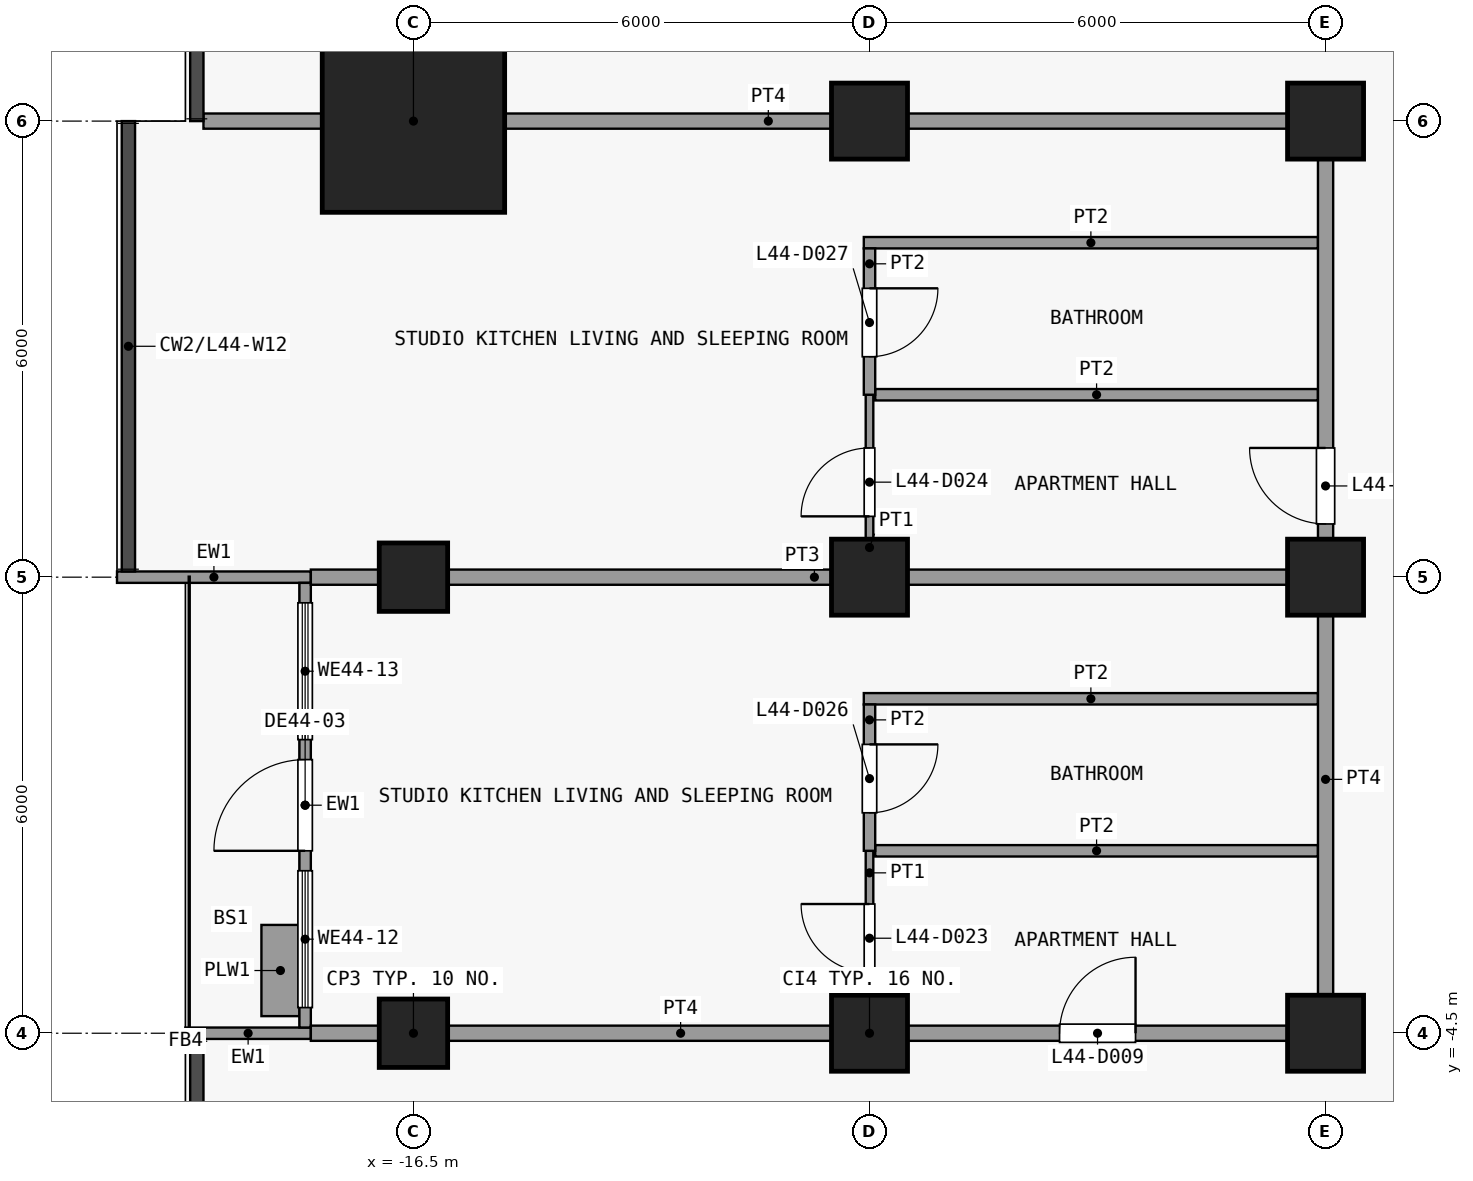
"""IFC4 building model, lengths in metres.
Left out: names, types, materials, properties, quantities, classifications, styles, units other than length and angle.
Written with IfcOpenShell. Run it as: python <this file> out.ifc"""

import sys

from ifc_helpers import new_model, si_unit, direction, frame, frame_2d, origin, origin_2d, place, context, subcontext, project, spatial, rectangle, extrude, element, fill, save


model = new_model("IFC4")
c1 = context("Model", 3, precision=1e-05, world=origin(), true_north=direction((0.0, 1.0)))
c2 = subcontext(c1, "Body", "Model", "MODEL_VIEW")
j1 = project(units=[si_unit("LENGTHUNIT", "METRE"), si_unit("PLANEANGLEUNIT", "RADIAN")], contexts=[c1])
p1 = place(None, origin())
s1 = spatial("IfcSite", under=j1, at=p1, CompositionType="ELEMENT")
p2 = place(p1, origin())
s2 = spatial("IfcBuilding", under=s1, at=p2, CompositionType="ELEMENT")
p3 = place(p2, frame((0.0, 0.0, 178.1)))
s3 = spatial("IfcBuildingStorey", under=s2, at=p3, CompositionType="ELEMENT", Elevation=178.1)
for number, where, z_axis, x_axis in (
    (1, (-16.5, -4.5, 0.0), (0.0, 0.0, 1.0), (1.0, 0.0, 0.0)),
    (2, (-16.5, 1.5, 0.0), (0.0, 0.0, 1.0), (1.0, 0.0, 0.0)),
):
    element("IfcColumn", number, at=place(p3, frame(where, z_axis=z_axis, x_axis=x_axis)), inside=s3, PredefinedType="COLUMN", context=c2, shape_type="SweptSolid", body=[
        extrude(rectangle(XDim=0.9, YDim=0.9, at=origin_2d()), origin(), (0.0, 0.0, 1.0), 3.6),
    ])
p4 = place(p3, frame((-16.5, 7.5, 0.0), z_axis=(0.0, 0.0, 1.0), x_axis=(1.0, 0.0, 0.0)))
e3 = element("IfcColumn", 3, at=p4, inside=s3, PredefinedType="COLUMN", context=c2, shape_type="SweptSolid", body=[
    extrude(rectangle(XDim=2.4, YDim=2.4, at=origin_2d()), origin(), (0.0, 0.0, 1.0), 3.6),
])
for number, where, z_axis, x_axis in (
    (4, (-10.5, -4.5, 0.0), (0.0, 0.0, 1.0), (1.0, 0.0, 0.0)),
    (5, (-10.5, 1.5, 0.0), (0.0, 0.0, 1.0), (1.0, 0.0, 0.0)),
    (6, (-10.5, 7.5, 0.0), (0.0, 0.0, 1.0), (1.0, 0.0, 0.0)),
    (7, (-4.5, -4.5, 0.0), (0.0, 0.0, 1.0), (1.0, 0.0, 0.0)),
    (8, (-4.5, 1.5, 0.0), (0.0, 0.0, 1.0), (1.0, 0.0, 0.0)),
    (9, (-4.5, 7.5, 0.0), (0.0, 0.0, 1.0), (1.0, 0.0, 0.0)),
):
    element("IfcColumn", number, at=place(p3, frame(where, z_axis=z_axis, x_axis=x_axis)), inside=s3, PredefinedType="COLUMN", context=c2, shape_type="SweptSolid", body=[
        extrude(rectangle(XDim=1.0, YDim=1.0, at=origin_2d()), origin(), (0.0, 0.0, 1.0), 3.6),
    ])
p5 = place(p3, frame((-17.85, -4.5, 0.0), z_axis=(0.0, 0.0, 1.0), x_axis=(-1.0, 0.0, 0.0)))
e10 = element("IfcWall", 10, at=p5, inside=s3, PredefinedType="SOLIDWALL", context=c2, shape_type="SweptSolid", body=[
    extrude(rectangle(XDim=1.65, YDim=0.15, at=frame_2d((0.825, 0.0))), origin(), (0.0, 0.0, 1.0), 3.3),
])
p6 = place(p3, frame((-17.85, 1.5, 0.0), z_axis=(0.0, 0.0, 1.0), x_axis=(-1.0, 0.0, 0.0)))
e11 = element("IfcWall", 11, at=p6, inside=s3, PredefinedType="SOLIDWALL", context=c2, shape_type="SweptSolid", body=[
    extrude(rectangle(XDim=2.55, YDim=0.15, at=frame_2d((1.275, 0.0))), origin(), (0.0, 0.0, 1.0), 3.3),
])
p7 = place(p3, frame((-17.925, -4.425, 0.0), z_axis=(0.0, 0.0, 1.0), x_axis=(0.0, 1.0, 0.0)))
e12 = element("IfcWall", 12, at=p7, inside=s3, PredefinedType="SOLIDWALL", context=c2, shape_type="SweptSolid", body=[
    extrude(rectangle(XDim=5.85, YDim=0.15, at=frame_2d((2.925, 0.0))), origin(), (0.0, 0.0, 1.0), 3.3),
])
p8 = place(p7, frame((2.325, 0.0, 0.0)))
e13 = element("IfcOpeningElement", 13, at=p8, cuts=e12, PredefinedType="OPENING", context=c2, shape_type="SweptSolid", body=[
    extrude(rectangle(XDim=1.2, YDim=2.4, at=frame_2d((0.6, 1.2))), frame((0.0, 0.085, 0.0), z_axis=(0.0, -1.0, 0.0), x_axis=(1.0, 0.0, 0.0)), (0.0, 0.0, 1.0), 0.17),
])
p9 = place(p7, frame((0.262, 0.0, 0.9)))
e14 = element("IfcOpeningElement", 14, at=p9, cuts=e12, PredefinedType="OPENING", context=c2, shape_type="SweptSolid", body=[
    extrude(rectangle(XDim=1.8, YDim=2.1, at=frame_2d((0.9, 1.05))), frame((0.0, 0.085, 0.0), z_axis=(0.0, -1.0, 0.0), x_axis=(1.0, 0.0, 0.0)), (0.0, 0.0, 1.0), 0.17),
])
p10 = place(p7, frame((3.788, 0.0, 0.9)))
e15 = element("IfcOpeningElement", 15, at=p10, cuts=e12, PredefinedType="OPENING", context=c2, shape_type="SweptSolid", body=[
    extrude(rectangle(XDim=1.8, YDim=2.1, at=frame_2d((0.9, 1.05))), frame((0.0, 0.085, 0.0), z_axis=(0.0, -1.0, 0.0), x_axis=(1.0, 0.0, 0.0)), (0.0, 0.0, 1.0), 0.17),
])
p11 = place(p3, frame((-18.25, -4.275, 0.0), z_axis=(0.0, 0.0, 1.0), x_axis=(0.0, 1.0, 0.0)))
e16 = element("IfcWall", 16, at=p11, inside=s3, PredefinedType="USERDEFINED", context=c2, shape_type="SweptSolid", body=[
    extrude(rectangle(XDim=1.2, YDim=0.5, at=frame_2d((0.6, 0.0))), origin(), (0.0, 0.0, 1.0), 0.9),
])
p12 = place(p3, frame((-17.85, -4.5, 0.0), z_axis=(0.0, 0.0, 1.0), x_axis=(1.0, 0.0, 0.0)))
e17 = element("IfcWall", 17, at=p12, inside=s3, PredefinedType="PARTITIONING", context=c2, shape_type="SweptSolid", body=[
    extrude(rectangle(XDim=13.45, YDim=0.2, at=frame_2d((6.725, 0.0))), origin(), (0.0, 0.0, 1.0), 3.3),
])
p13 = place(p12, frame((9.85, 0.0, 0.0)))
e18 = element("IfcOpeningElement", 18, at=p13, cuts=e17, PredefinedType="OPENING", context=c2, shape_type="SweptSolid", body=[
    extrude(rectangle(XDim=1.0, YDim=2.1, at=frame_2d((0.5, 1.05))), frame((0.0, 0.11, 0.0), z_axis=(0.0, -1.0, 0.0), x_axis=(1.0, 0.0, 0.0)), (0.0, 0.0, 1.0), 0.22),
])
p14 = place(p3, frame((-10.425, -2.1, 0.0), z_axis=(0.0, 0.0, 1.0), x_axis=(1.0, 0.0, 0.0)))
e19 = element("IfcWall", 19, at=p14, inside=s3, PredefinedType="PARTITIONING", context=c2, shape_type="SweptSolid", body=[
    extrude(rectangle(XDim=5.825, YDim=0.15, at=frame_2d((2.913, 0.0))), origin(), (0.0, 0.0, 1.0), 3.3),
])
p15 = place(p3, frame((-10.575, -0.1, 0.0), z_axis=(0.0, 0.0, 1.0), x_axis=(1.0, 0.0, 0.0)))
e20 = element("IfcWall", 20, at=p15, inside=s3, PredefinedType="PARTITIONING", context=c2, shape_type="SweptSolid", body=[
    extrude(rectangle(XDim=5.975, YDim=0.15, at=frame_2d((2.987, 0.0))), origin(), (0.0, 0.0, 1.0), 3.3),
])
p16 = place(p3, frame((-17.85, 1.5, 0.0), z_axis=(0.0, 0.0, 1.0), x_axis=(1.0, 0.0, 0.0)))
e21 = element("IfcWall", 21, at=p16, inside=s3, PredefinedType="PARTITIONING", context=c2, shape_type="SweptSolid", body=[
    extrude(rectangle(XDim=13.25, YDim=0.2, at=frame_2d((6.625, 0.0))), origin(), (0.0, 0.0, 1.0), 3.3),
])
p17 = place(p3, frame((-10.425, 3.9, 0.0), z_axis=(0.0, 0.0, 1.0), x_axis=(1.0, 0.0, 0.0)))
e22 = element("IfcWall", 22, at=p17, inside=s3, PredefinedType="PARTITIONING", context=c2, shape_type="SweptSolid", body=[
    extrude(rectangle(XDim=5.825, YDim=0.15, at=frame_2d((2.913, 0.0))), origin(), (0.0, 0.0, 1.0), 3.3),
])
p18 = place(p3, frame((-10.575, 5.9, 0.0), z_axis=(0.0, 0.0, 1.0), x_axis=(1.0, 0.0, 0.0)))
e23 = element("IfcWall", 23, at=p18, inside=s3, PredefinedType="PARTITIONING", context=c2, shape_type="SweptSolid", body=[
    extrude(rectangle(XDim=5.975, YDim=0.15, at=frame_2d((2.987, 0.0))), origin(), (0.0, 0.0, 1.0), 3.3),
])
p19 = place(p3, frame((-19.262, 7.5, 0.0), z_axis=(0.0, 0.0, 1.0), x_axis=(1.0, 0.0, 0.0)))
e24 = element("IfcWall", 24, at=p19, inside=s3, PredefinedType="PARTITIONING", context=c2, shape_type="SweptSolid", body=[
    extrude(rectangle(XDim=14.863, YDim=0.2, at=frame_2d((7.431, 0.0))), origin(), (0.0, 0.0, 1.0), 3.3),
])
p20 = place(p3, frame((-10.5, -4.4, 0.0), z_axis=(0.0, 0.0, 1.0), x_axis=(0.0, 1.0, 0.0)))
e25 = element("IfcWall", 25, at=p20, inside=s3, PredefinedType="PARTITIONING", context=c2, shape_type="SweptSolid", body=[
    extrude(rectangle(XDim=2.3, YDim=0.1, at=frame_2d((1.15, 0.0))), origin(), (0.0, 0.0, 1.0), 3.3),
])
p21 = place(p20, frame((0.7, 0.0, 0.0)))
e26 = element("IfcOpeningElement", 26, at=p21, cuts=e25, PredefinedType="OPENING", context=c2, shape_type="SweptSolid", body=[
    extrude(rectangle(XDim=0.9, YDim=2.1, at=frame_2d((0.45, 1.05))), frame((0.0, 0.06, 0.0), z_axis=(0.0, -1.0, 0.0), x_axis=(1.0, 0.0, 0.0)), (0.0, 0.0, 1.0), 0.12),
])
p22 = place(p3, frame((-10.5, 1.6, 0.0), z_axis=(0.0, 0.0, 1.0), x_axis=(0.0, 1.0, 0.0)))
e27 = element("IfcWall", 27, at=p22, inside=s3, PredefinedType="PARTITIONING", context=c2, shape_type="SweptSolid", body=[
    extrude(rectangle(XDim=2.3, YDim=0.1, at=frame_2d((1.15, 0.0))), origin(), (0.0, 0.0, 1.0), 3.3),
])
p23 = place(p22, frame((0.7, 0.0, 0.0)))
e28 = element("IfcOpeningElement", 28, at=p23, cuts=e27, PredefinedType="OPENING", context=c2, shape_type="SweptSolid", body=[
    extrude(rectangle(XDim=0.9, YDim=2.1, at=frame_2d((0.45, 1.05))), frame((0.0, 0.06, 0.0), z_axis=(0.0, -1.0, 0.0), x_axis=(1.0, 0.0, 0.0)), (0.0, 0.0, 1.0), 0.12),
])
p24 = place(p3, frame((-10.5, -2.1, 0.0), z_axis=(0.0, 0.0, 1.0), x_axis=(0.0, 1.0, 0.0)))
e29 = element("IfcWall", 29, at=p24, inside=s3, PredefinedType="PARTITIONING", context=c2, shape_type="SweptSolid", body=[
    extrude(rectangle(XDim=1.925, YDim=0.15, at=frame_2d((0.962, 0.0))), origin(), (0.0, 0.0, 1.0), 3.3),
])
p25 = place(p24, frame((0.5, 0.0, 0.0)))
e30 = element("IfcOpeningElement", 30, at=p25, cuts=e29, PredefinedType="OPENING", context=c2, shape_type="SweptSolid", body=[
    extrude(rectangle(XDim=0.9, YDim=2.1, at=frame_2d((0.45, 1.05))), frame((0.0, 0.085, 0.0), z_axis=(0.0, -1.0, 0.0), x_axis=(1.0, 0.0, 0.0)), (0.0, 0.0, 1.0), 0.17),
])
p26 = place(p3, frame((-10.5, 3.9, 0.0), z_axis=(0.0, 0.0, 1.0), x_axis=(0.0, 1.0, 0.0)))
e31 = element("IfcWall", 31, at=p26, inside=s3, PredefinedType="PARTITIONING", context=c2, shape_type="SweptSolid", body=[
    extrude(rectangle(XDim=1.925, YDim=0.15, at=frame_2d((0.962, 0.0))), origin(), (0.0, 0.0, 1.0), 3.3),
])
p27 = place(p26, frame((0.5, 0.0, 0.0)))
e32 = element("IfcOpeningElement", 32, at=p27, cuts=e31, PredefinedType="OPENING", context=c2, shape_type="SweptSolid", body=[
    extrude(rectangle(XDim=0.9, YDim=2.1, at=frame_2d((0.45, 1.05))), frame((0.0, 0.085, 0.0), z_axis=(0.0, -1.0, 0.0), x_axis=(1.0, 0.0, 0.0)), (0.0, 0.0, 1.0), 0.17),
])
p28 = place(p3, frame((-4.5, -4.4, 0.0), z_axis=(0.0, 0.0, 1.0), x_axis=(0.0, 1.0, 0.0)))
e33 = element("IfcWall", 33, at=p28, inside=s3, PredefinedType="PARTITIONING", context=c2, shape_type="SweptSolid", body=[
    extrude(rectangle(XDim=11.8, YDim=0.2, at=frame_2d((5.9, 0.0))), origin(), (0.0, 0.0, 1.0), 3.3),
])
p29 = place(p28, frame((6.6, 0.0, 0.0)))
e34 = element("IfcOpeningElement", 34, at=p29, cuts=e33, PredefinedType="OPENING", context=c2, shape_type="SweptSolid", body=[
    extrude(rectangle(XDim=1.0, YDim=2.1, at=frame_2d((0.5, 1.05))), frame((0.0, 0.11, 0.0), z_axis=(0.0, -1.0, 0.0), x_axis=(1.0, 0.0, 0.0)), (0.0, 0.0, 1.0), 0.22),
])
p30 = place(p8, origin())
e35 = element("IfcDoor", 35, at=p30, inside=s3, OperationType="SINGLE_SWING_LEFT", PredefinedType="DOOR", context=c2, shape_type="SweptSolid", body=[
    extrude(rectangle(XDim=1.2, YDim=2.4, at=frame_2d((0.6, 1.2))), frame((0.0, 0.025, 0.0), z_axis=(0.0, -1.0, 0.0), x_axis=(1.0, 0.0, 0.0)), (0.0, 0.0, 1.0), 0.05),
])
fill(e13, e35)
p31 = place(p9, origin())
e36 = element("IfcWindow", 36, at=p31, inside=s3, PartitioningType="SINGLE_PANEL", PredefinedType="WINDOW", context=c2, shape_type="SweptSolid", body=[
    extrude(rectangle(XDim=1.8, YDim=2.1, at=frame_2d((0.9, 1.05))), frame((0.0, 0.03, 0.0), z_axis=(0.0, -1.0, 0.0), x_axis=(1.0, 0.0, 0.0)), (0.0, 0.0, 1.0), 0.06),
])
fill(e14, e36)
p32 = place(p10, origin())
e37 = element("IfcWindow", 37, at=p32, inside=s3, PartitioningType="SINGLE_PANEL", PredefinedType="WINDOW", context=c2, shape_type="SweptSolid", body=[
    extrude(rectangle(XDim=1.8, YDim=2.1, at=frame_2d((0.9, 1.05))), frame((0.0, 0.03, 0.0), z_axis=(0.0, -1.0, 0.0), x_axis=(1.0, 0.0, 0.0)), (0.0, 0.0, 1.0), 0.06),
])
fill(e15, e37)
p33 = place(p13, origin())
e38 = element("IfcDoor", 38, at=p33, inside=s3, OperationType="SINGLE_SWING_LEFT", PredefinedType="DOOR", context=c2, shape_type="SweptSolid", body=[
    extrude(rectangle(XDim=1.0, YDim=2.1, at=frame_2d((0.5, 1.05))), frame((0.0, 0.025, 0.0), z_axis=(0.0, -1.0, 0.0), x_axis=(1.0, 0.0, 0.0)), (0.0, 0.0, 1.0), 0.05),
])
fill(e18, e38)
p34 = place(p21, origin())
e39 = element("IfcDoor", 39, at=p34, inside=s3, OperationType="SINGLE_SWING_LEFT", PredefinedType="DOOR", context=c2, shape_type="SweptSolid", body=[
    extrude(rectangle(XDim=0.9, YDim=2.1, at=frame_2d((0.45, 1.05))), frame((0.0, 0.025, 0.0), z_axis=(0.0, -1.0, 0.0), x_axis=(1.0, 0.0, 0.0)), (0.0, 0.0, 1.0), 0.05),
])
fill(e26, e39)
p35 = place(p23, origin())
e40 = element("IfcDoor", 40, at=p35, inside=s3, OperationType="SINGLE_SWING_RIGHT", PredefinedType="DOOR", context=c2, shape_type="SweptSolid", body=[
    extrude(rectangle(XDim=0.9, YDim=2.1, at=frame_2d((0.45, 1.05))), frame((0.0, 0.025, 0.0), z_axis=(0.0, -1.0, 0.0), x_axis=(1.0, 0.0, 0.0)), (0.0, 0.0, 1.0), 0.05),
])
fill(e28, e40)
p36 = place(p25, origin())
e41 = element("IfcDoor", 41, at=p36, inside=s3, OperationType="SINGLE_SWING_RIGHT", PredefinedType="DOOR", context=c2, shape_type="SweptSolid", body=[
    extrude(rectangle(XDim=0.9, YDim=2.1, at=frame_2d((0.45, 1.05))), frame((0.0, 0.025, 0.0), z_axis=(0.0, -1.0, 0.0), x_axis=(1.0, 0.0, 0.0)), (0.0, 0.0, 1.0), 0.05),
])
fill(e30, e41)
p37 = place(p27, origin())
e42 = element("IfcDoor", 42, at=p37, inside=s3, OperationType="SINGLE_SWING_RIGHT", PredefinedType="DOOR", context=c2, shape_type="SweptSolid", body=[
    extrude(rectangle(XDim=0.9, YDim=2.1, at=frame_2d((0.45, 1.05))), frame((0.0, 0.025, 0.0), z_axis=(0.0, -1.0, 0.0), x_axis=(1.0, 0.0, 0.0)), (0.0, 0.0, 1.0), 0.05),
])
fill(e32, e42)
p38 = place(p29, origin())
e43 = element("IfcDoor", 43, at=p38, inside=s3, OperationType="SINGLE_SWING_LEFT", PredefinedType="DOOR", context=c2, shape_type="SweptSolid", body=[
    extrude(rectangle(XDim=1.0, YDim=2.1, at=frame_2d((0.5, 1.05))), frame((0.0, 0.025, 0.0), z_axis=(0.0, -1.0, 0.0), x_axis=(1.0, 0.0, 0.0)), (0.0, 0.0, 1.0), 0.05),
])
fill(e34, e43)
save(model, sys.argv[1])
